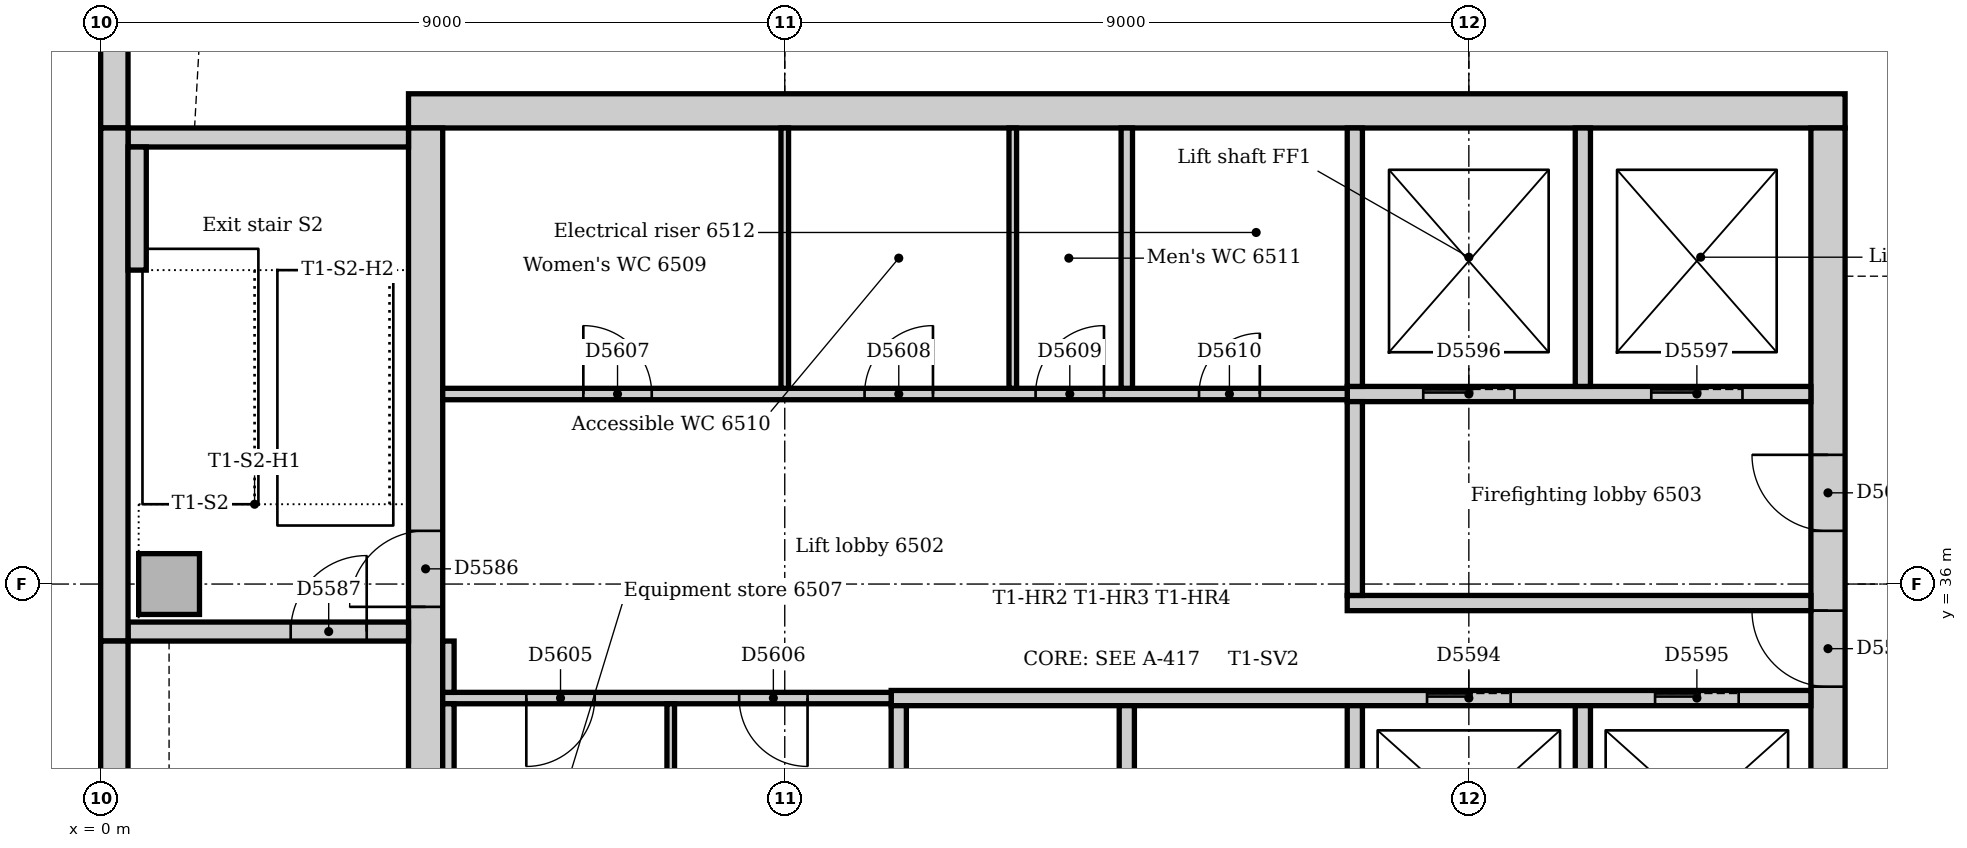
"""IFC4 building model, lengths in metres.
Left out: names, types, materials, properties, quantities, classifications, styles, units other than length and angle.
Written with IfcOpenShell. Run it as: python <this file> out.ifc"""

import sys

from ifc_helpers import new_model, si_unit, direction, frame, frame_2d, origin, origin_2d, place, context, subcontext, project, spatial, rectangle, extrude, element, fill, save


model = new_model("IFC4")
c1 = context("Model", 3, precision=1e-05, world=origin(), true_north=direction((0.0, 1.0)))
c2 = subcontext(c1, "Body", "Model", "MODEL_VIEW")
j1 = project(units=[si_unit("LENGTHUNIT", "METRE"), si_unit("PLANEANGLEUNIT", "RADIAN")], contexts=[c1])
p1 = place(None, origin())
s1 = spatial("IfcSite", under=j1, at=p1, CompositionType="ELEMENT")
p2 = place(p1, origin())
s2 = spatial("IfcBuilding", under=s1, at=p2, CompositionType="ELEMENT")
p3 = place(p2, frame((0.0, 0.0, 271.0)))
s3 = spatial("IfcBuildingStorey", under=s2, at=p3, CompositionType="ELEMENT", Elevation=271.0)
p4 = place(p3, frame((22.95, 42.225, 0.0), z_axis=(0.0, 0.0, 1.0), x_axis=(-1.0, 0.0, 0.0)))
e1 = element("IfcWall", 1, at=p4, inside=s3, PredefinedType="SOLIDWALL", context=c2, shape_type="SweptSolid", body=[
    extrude(rectangle(XDim=18.9, YDim=0.45, at=frame_2d((9.45, 0.0))), origin(), (0.0, 0.0, 1.0), 4.0),
])
p5 = place(p3, frame((22.725, 31.5, 0.0), z_axis=(0.0, 0.0, 1.0), x_axis=(0.0, 1.0, 0.0)))
e2 = element("IfcWall", 2, at=p5, inside=s3, PredefinedType="SOLIDWALL", context=c2, shape_type="SweptSolid", body=[
    extrude(rectangle(XDim=10.5, YDim=0.45, at=frame_2d((5.25, 0.0))), origin(), (0.0, 0.0, 1.0), 4.0),
])
p6 = place(p5, frame((3.15, 0.0, 0.0)))
e3 = element("IfcOpeningElement", 3, at=p6, cuts=e2, PredefinedType="OPENING", context=c2, shape_type="SweptSolid", body=[
    extrude(rectangle(XDim=1.0, YDim=2.1, at=frame_2d((0.5, 1.05))), frame((0.0, 0.235, 0.0), z_axis=(0.0, -1.0, 0.0), x_axis=(1.0, 0.0, 0.0)), (0.0, 0.0, 1.0), 0.47),
])
p7 = place(p5, frame((5.2, 0.0, 0.0)))
e4 = element("IfcOpeningElement", 4, at=p7, cuts=e2, PredefinedType="OPENING", context=c2, shape_type="SweptSolid", body=[
    extrude(rectangle(XDim=1.0, YDim=2.1, at=frame_2d((0.5, 1.05))), frame((0.0, 0.235, 0.0), z_axis=(0.0, -1.0, 0.0), x_axis=(1.0, 0.0, 0.0)), (0.0, 0.0, 1.0), 0.47),
])
p8 = place(p3, frame((4.275, 42.0, 0.0), z_axis=(0.0, 0.0, 1.0), x_axis=(0.0, -1.0, 0.0)))
e5 = element("IfcWall", 5, at=p8, inside=s3, PredefinedType="SOLIDWALL", context=c2, shape_type="SweptSolid", body=[
    extrude(rectangle(XDim=10.5, YDim=0.45, at=frame_2d((5.25, 0.0))), origin(), (0.0, 0.0, 1.0), 4.0),
])
p9 = place(p8, frame((5.3, 0.0, 0.0)))
e6 = element("IfcOpeningElement", 6, at=p9, cuts=e5, PredefinedType="OPENING", context=c2, shape_type="SweptSolid", body=[
    extrude(rectangle(XDim=1.0, YDim=2.1, at=frame_2d((0.5, 1.05))), frame((0.0, 0.235, 0.0), z_axis=(0.0, -1.0, 0.0), x_axis=(1.0, 0.0, 0.0)), (0.0, 0.0, 1.0), 0.47),
])
p10 = place(p3, frame((0.36, 35.375, 0.0), z_axis=(0.0, 0.0, 1.0), x_axis=(1.0, 0.0, 0.0)))
e7 = element("IfcWall", 7, at=p10, inside=s3, PredefinedType="SOLIDWALL", context=c2, shape_type="SweptSolid", body=[
    extrude(rectangle(XDim=3.69, YDim=0.25, at=frame_2d((1.845, 0.0))), origin(), (0.0, 0.0, 1.0), 4.0),
])
p11 = place(p10, frame((2.14, 0.0, 0.0)))
e8 = element("IfcOpeningElement", 8, at=p11, cuts=e7, PredefinedType="OPENING", context=c2, shape_type="SweptSolid", body=[
    extrude(rectangle(XDim=1.0, YDim=2.1, at=frame_2d((0.5, 1.05))), frame((0.0, 0.135, 0.0), z_axis=(0.0, -1.0, 0.0), x_axis=(1.0, 0.0, 0.0)), (0.0, 0.0, 1.0), 0.27),
])
p12 = place(p3, frame((4.05, 41.875, 0.0), z_axis=(0.0, 0.0, 1.0), x_axis=(-1.0, 0.0, 0.0)))
e9 = element("IfcWall", 9, at=p12, inside=s3, PredefinedType="SOLIDWALL", context=c2, shape_type="SweptSolid", body=[
    extrude(rectangle(XDim=3.69, YDim=0.25, at=frame_2d((1.845, 0.0))), origin(), (0.0, 0.0, 1.0), 4.0),
])
p13 = place(p3, frame((0.9, 36.0, 0.0), z_axis=(0.0, 0.0, 1.0), x_axis=(1.0, 0.0, 0.0)))
e10 = element("IfcColumn", 10, at=p13, inside=s3, PredefinedType="COLUMN", context=c2, shape_type="SweptSolid", body=[
    extrude(rectangle(XDim=0.8, YDim=0.8, at=origin_2d()), origin(), (0.0, 0.0, 1.0), 4.0),
])
p14 = place(p3, frame((0.18, 58.757, 0.0), z_axis=(0.0, 0.0, 1.0), x_axis=(0.0, -1.0, 0.0)))
e11 = element("IfcWall", 11, at=p14, inside=s3, PredefinedType="STANDARD", context=c2, shape_type="SweptSolid", body=[
    extrude(rectangle(XDim=16.757, YDim=0.36, at=frame_2d((8.379, 0.0))), origin(), (0.0, 0.0, 1.0), 3.85),
])
p15 = place(p14, frame((3.107, 0.0, 0.9)))
e12 = element("IfcOpeningElement", 12, at=p15, cuts=e11, PredefinedType="OPENING", context=c2, shape_type="SweptSolid", body=[
    extrude(rectangle(XDim=3.3, YDim=1.6, at=frame_2d((1.65, 0.8))), frame((0.0, 0.19, 0.0), z_axis=(0.0, -1.0, 0.0), x_axis=(1.0, 0.0, 0.0)), (0.0, 0.0, 1.0), 0.38),
])
p16 = place(p14, frame((7.607, 0.0, 0.9)))
e13 = element("IfcOpeningElement", 13, at=p16, cuts=e11, PredefinedType="OPENING", context=c2, shape_type="SweptSolid", body=[
    extrude(rectangle(XDim=3.3, YDim=1.6, at=frame_2d((1.65, 0.8))), frame((0.0, 0.19, 0.0), z_axis=(0.0, -1.0, 0.0), x_axis=(1.0, 0.0, 0.0)), (0.0, 0.0, 1.0), 0.38),
])
p17 = place(p14, frame((12.107, 0.0, 0.9)))
e14 = element("IfcOpeningElement", 14, at=p17, cuts=e11, PredefinedType="OPENING", context=c2, shape_type="SweptSolid", body=[
    extrude(rectangle(XDim=3.3, YDim=1.6, at=frame_2d((1.65, 0.8))), frame((0.0, 0.19, 0.0), z_axis=(0.0, -1.0, 0.0), x_axis=(1.0, 0.0, 0.0)), (0.0, 0.0, 1.0), 0.38),
])
p18 = place(p3, frame((0.18, 42.0, 0.0), z_axis=(0.0, 0.0, 1.0), x_axis=(0.0, -1.0, 0.0)))
e15 = element("IfcWall", 15, at=p18, inside=s3, PredefinedType="STANDARD", context=c2, shape_type="SweptSolid", body=[
    extrude(rectangle(XDim=6.75, YDim=0.36, at=frame_2d((3.375, 0.0))), origin(), (0.0, 0.0, 1.0), 3.85),
])
p19 = place(p3, frame((0.18, 35.25, 0.0), z_axis=(0.0, 0.0, 1.0), x_axis=(0.0, -1.0, 0.0)))
e16 = element("IfcWall", 16, at=p19, inside=s3, PredefinedType="STANDARD", context=c2, shape_type="SweptSolid", body=[
    extrude(rectangle(XDim=7.5, YDim=0.36, at=frame_2d((3.75, 0.0))), origin(), (0.0, 0.0, 1.0), 3.85),
])
p20 = place(p3, frame((0.48, 40.13, 0.0), z_axis=(0.0, 0.0, 1.0), x_axis=(0.0, 1.0, 0.0)))
e17 = element("IfcWall", 17, at=p20, inside=s3, PredefinedType="STANDARD", context=c2, shape_type="SweptSolid", body=[
    extrude(rectangle(XDim=1.62, YDim=0.24, at=frame_2d((0.81, 0.0))), origin(), (0.0, 0.0, 1.0), 4.0),
])
p21 = place(p3, frame((16.4, 35.75, 0.0), z_axis=(0.0, 0.0, 1.0), x_axis=(1.0, 0.0, 0.0)))
e18 = element("IfcWall", 18, at=p21, inside=s3, PredefinedType="PARTITIONING", context=c2, shape_type="SweptSolid", body=[
    extrude(rectangle(XDim=6.1, YDim=0.2, at=frame_2d((3.05, 0.0))), origin(), (0.0, 0.0, 1.0), 3.85),
])
p22 = place(p3, frame((16.4, 38.5, 0.0), z_axis=(0.0, 0.0, 1.0), x_axis=(1.0, 0.0, 0.0)))
e19 = element("IfcWall", 19, at=p22, inside=s3, PredefinedType="PARTITIONING", context=c2, shape_type="SweptSolid", body=[
    extrude(rectangle(XDim=6.1, YDim=0.2, at=frame_2d((3.05, 0.0))), origin(), (0.0, 0.0, 1.0), 3.85),
])
p23 = place(p22, frame((1.0, 0.0, 0.0)))
e20 = element("IfcOpeningElement", 20, at=p23, cuts=e19, PredefinedType="OPENING", context=c2, shape_type="SweptSolid", body=[
    extrude(rectangle(XDim=1.2, YDim=2.1, at=frame_2d((0.6, 1.05))), frame((0.0, 0.11, 0.0), z_axis=(0.0, -1.0, 0.0), x_axis=(1.0, 0.0, 0.0)), (0.0, 0.0, 1.0), 0.22),
])
p24 = place(p22, frame((4.0, 0.0, 0.0)))
e21 = element("IfcOpeningElement", 21, at=p24, cuts=e19, PredefinedType="OPENING", context=c2, shape_type="SweptSolid", body=[
    extrude(rectangle(XDim=1.2, YDim=2.1, at=frame_2d((0.6, 1.05))), frame((0.0, 0.11, 0.0), z_axis=(0.0, -1.0, 0.0), x_axis=(1.0, 0.0, 0.0)), (0.0, 0.0, 1.0), 0.22),
])
p25 = place(p3, frame((16.5, 35.85, 0.0), z_axis=(0.0, 0.0, 1.0), x_axis=(0.0, 1.0, 0.0)))
e22 = element("IfcWall", 22, at=p25, inside=s3, PredefinedType="PARTITIONING", context=c2, shape_type="SweptSolid", body=[
    extrude(rectangle(XDim=2.55, YDim=0.2, at=frame_2d((1.275, 0.0))), origin(), (0.0, 0.0, 1.0), 3.85),
])
p26 = place(p3, frame((10.4, 34.5, 0.0), z_axis=(0.0, 0.0, 1.0), x_axis=(1.0, 0.0, 0.0)))
e23 = element("IfcWall", 23, at=p26, inside=s3, PredefinedType="PARTITIONING", context=c2, shape_type="SweptSolid", body=[
    extrude(rectangle(XDim=12.1, YDim=0.2, at=frame_2d((6.05, 0.0))), origin(), (0.0, 0.0, 1.0), 3.85),
])
p27 = place(p26, frame((7.05, 0.0, 0.0)))
e24 = element("IfcOpeningElement", 24, at=p27, cuts=e23, PredefinedType="OPENING", context=c2, shape_type="SweptSolid", body=[
    extrude(rectangle(XDim=1.1, YDim=2.1, at=frame_2d((0.55, 1.05))), frame((0.0, 0.11, 0.0), z_axis=(0.0, -1.0, 0.0), x_axis=(1.0, 0.0, 0.0)), (0.0, 0.0, 1.0), 0.22),
])
p28 = place(p26, frame((10.05, 0.0, 0.0)))
e25 = element("IfcOpeningElement", 25, at=p28, cuts=e23, PredefinedType="OPENING", context=c2, shape_type="SweptSolid", body=[
    extrude(rectangle(XDim=1.1, YDim=2.1, at=frame_2d((0.55, 1.05))), frame((0.0, 0.11, 0.0), z_axis=(0.0, -1.0, 0.0), x_axis=(1.0, 0.0, 0.0)), (0.0, 0.0, 1.0), 0.22),
])
for number, where, z_axis, x_axis in (
    (26, (10.5, 31.75, 0.0), (0.0, 0.0, 1.0), (0.0, 1.0, 0.0)),
    (27, (13.5, 31.75, 0.0), (0.0, 0.0, 1.0), (0.0, 1.0, 0.0)),
    (28, (16.5, 31.75, 0.0), (0.0, 0.0, 1.0), (0.0, 1.0, 0.0)),
    (29, (19.5, 31.75, 0.0), (0.0, 0.0, 1.0), (0.0, 1.0, 0.0)),
):
    element("IfcWall", number, at=place(p3, frame(where, z_axis=z_axis, x_axis=x_axis)), inside=s3, PredefinedType="PARTITIONING", context=c2, shape_type="SweptSolid", body=[
        extrude(rectangle(XDim=2.65, YDim=0.2, at=frame_2d((1.325, 0.0))), origin(), (0.0, 0.0, 1.0), 3.85),
    ])
for number, where, z_axis, x_axis in (
    (30, (16.5, 38.6, 0.0), (0.0, 0.0, 1.0), (0.0, 1.0, 0.0)),
    (31, (19.5, 38.6, 0.0), (0.0, 0.0, 1.0), (0.0, 1.0, 0.0)),
):
    element("IfcWall", number, at=place(p3, frame(where, z_axis=z_axis, x_axis=x_axis)), inside=s3, PredefinedType="PARTITIONING", context=c2, shape_type="SweptSolid", body=[
        extrude(rectangle(XDim=3.4, YDim=0.2, at=frame_2d((1.7, 0.0))), origin(), (0.0, 0.0, 1.0), 3.85),
    ])
p29 = place(p3, frame((4.5, 38.5, 0.0), z_axis=(0.0, 0.0, 1.0), x_axis=(1.0, 0.0, 0.0)))
e32 = element("IfcWall", 32, at=p29, inside=s3, PredefinedType="PARTITIONING", context=c2, shape_type="SweptSolid", body=[
    extrude(rectangle(XDim=11.9, YDim=0.15, at=frame_2d((5.95, 0.0))), origin(), (0.0, 0.0, 1.0), 3.85),
])
p30 = place(p29, frame((1.85, 0.0, 0.0)))
e33 = element("IfcOpeningElement", 33, at=p30, cuts=e32, PredefinedType="OPENING", context=c2, shape_type="SweptSolid", body=[
    extrude(rectangle(XDim=0.9, YDim=2.1, at=frame_2d((0.45, 1.05))), frame((0.0, 0.085, 0.0), z_axis=(0.0, -1.0, 0.0), x_axis=(1.0, 0.0, 0.0)), (0.0, 0.0, 1.0), 0.17),
])
p31 = place(p29, frame((5.55, 0.0, 0.0)))
e34 = element("IfcOpeningElement", 34, at=p31, cuts=e32, PredefinedType="OPENING", context=c2, shape_type="SweptSolid", body=[
    extrude(rectangle(XDim=0.9, YDim=2.1, at=frame_2d((0.45, 1.05))), frame((0.0, 0.085, 0.0), z_axis=(0.0, -1.0, 0.0), x_axis=(1.0, 0.0, 0.0)), (0.0, 0.0, 1.0), 0.17),
])
p32 = place(p29, frame((7.8, 0.0, 0.0)))
e35 = element("IfcOpeningElement", 35, at=p32, cuts=e32, PredefinedType="OPENING", context=c2, shape_type="SweptSolid", body=[
    extrude(rectangle(XDim=0.9, YDim=2.1, at=frame_2d((0.45, 1.05))), frame((0.0, 0.085, 0.0), z_axis=(0.0, -1.0, 0.0), x_axis=(1.0, 0.0, 0.0)), (0.0, 0.0, 1.0), 0.17),
])
p33 = place(p29, frame((9.95, 0.0, 0.0)))
e36 = element("IfcOpeningElement", 36, at=p33, cuts=e32, PredefinedType="OPENING", context=c2, shape_type="SweptSolid", body=[
    extrude(rectangle(XDim=0.8, YDim=2.1, at=frame_2d((0.4, 1.05))), frame((0.0, 0.085, 0.0), z_axis=(0.0, -1.0, 0.0), x_axis=(1.0, 0.0, 0.0)), (0.0, 0.0, 1.0), 0.17),
])
p34 = place(p3, frame((4.5, 34.5, 0.0), z_axis=(0.0, 0.0, 1.0), x_axis=(1.0, 0.0, 0.0)))
e37 = element("IfcWall", 37, at=p34, inside=s3, PredefinedType="PARTITIONING", context=c2, shape_type="SweptSolid", body=[
    extrude(rectangle(XDim=5.9, YDim=0.15, at=frame_2d((2.95, 0.0))), origin(), (0.0, 0.0, 1.0), 3.85),
])
p35 = place(p34, frame((1.1, 0.0, 0.0)))
e38 = element("IfcOpeningElement", 38, at=p35, cuts=e37, PredefinedType="OPENING", context=c2, shape_type="SweptSolid", body=[
    extrude(rectangle(XDim=0.9, YDim=2.1, at=frame_2d((0.45, 1.05))), frame((0.0, 0.085, 0.0), z_axis=(0.0, -1.0, 0.0), x_axis=(1.0, 0.0, 0.0)), (0.0, 0.0, 1.0), 0.17),
])
p36 = place(p34, frame((3.9, 0.0, 0.0)))
e39 = element("IfcOpeningElement", 39, at=p36, cuts=e37, PredefinedType="OPENING", context=c2, shape_type="SweptSolid", body=[
    extrude(rectangle(XDim=0.9, YDim=2.1, at=frame_2d((0.45, 1.05))), frame((0.0, 0.085, 0.0), z_axis=(0.0, -1.0, 0.0), x_axis=(1.0, 0.0, 0.0)), (0.0, 0.0, 1.0), 0.17),
])
p37 = place(p3, frame((4.575, 34.575, 0.0), z_axis=(0.0, 0.0, 1.0), x_axis=(0.0, 1.0, 0.0)))
e40 = element("IfcWall", 40, at=p37, inside=s3, PredefinedType="PARTITIONING", context=c2, shape_type="SweptSolid", body=[
    extrude(rectangle(XDim=0.675, YDim=0.15, at=frame_2d((0.338, 0.0))), origin(), (0.0, 0.0, 1.0), 3.85),
])
p38 = place(p3, frame((4.575, 31.75, 0.0), z_axis=(0.0, 0.0, 1.0), x_axis=(0.0, 1.0, 0.0)))
e41 = element("IfcWall", 41, at=p38, inside=s3, PredefinedType="PARTITIONING", context=c2, shape_type="SweptSolid", body=[
    extrude(rectangle(XDim=2.675, YDim=0.15, at=frame_2d((1.337, 0.0))), origin(), (0.0, 0.0, 1.0), 3.85),
])
p39 = place(p3, frame((13.5, 38.575, 0.0), z_axis=(0.0, 0.0, 1.0), x_axis=(0.0, 1.0, 0.0)))
e42 = element("IfcWall", 42, at=p39, inside=s3, PredefinedType="PARTITIONING", context=c2, shape_type="SweptSolid", body=[
    extrude(rectangle(XDim=3.425, YDim=0.15, at=frame_2d((1.712, 0.0))), origin(), (0.0, 0.0, 1.0), 3.85),
])
for number, where, z_axis, x_axis in (
    (43, (9.0, 38.575, 0.0), (0.0, 0.0, 1.0), (0.0, 1.0, 0.0)),
    (44, (12.0, 38.575, 0.0), (0.0, 0.0, 1.0), (0.0, 1.0, 0.0)),
):
    element("IfcWall", number, at=place(p3, frame(where, z_axis=z_axis, x_axis=x_axis)), inside=s3, PredefinedType="PARTITIONING", context=c2, shape_type="SweptSolid", body=[
        extrude(rectangle(XDim=3.425, YDim=0.1, at=frame_2d((1.712, 0.0))), origin(), (0.0, 0.0, 1.0), 3.85),
    ])
p40 = place(p3, frame((7.5, 31.75, 0.0), z_axis=(0.0, 0.0, 1.0), x_axis=(0.0, 1.0, 0.0)))
e45 = element("IfcWall", 45, at=p40, inside=s3, PredefinedType="PARTITIONING", context=c2, shape_type="SweptSolid", body=[
    extrude(rectangle(XDim=2.675, YDim=0.1, at=frame_2d((1.337, 0.0))), origin(), (0.0, 0.0, 1.0), 3.85),
])
p41 = place(p9, frame((1.0, 0.0, 0.0), z_axis=(0.0, 0.0, 1.0), x_axis=(-1.0, 0.0, 0.0)))
e46 = element("IfcDoor", 46, at=p41, inside=s3, OperationType="SINGLE_SWING_LEFT", PredefinedType="DOOR", context=c2, shape_type="SweptSolid", body=[
    extrude(rectangle(XDim=1.0, YDim=2.1, at=frame_2d((0.5, 1.05))), frame((0.0, 0.025, 0.0), z_axis=(0.0, -1.0, 0.0), x_axis=(1.0, 0.0, 0.0)), (0.0, 0.0, 1.0), 0.05),
])
fill(e6, e46)
p42 = place(p11, origin())
e47 = element("IfcDoor", 47, at=p42, inside=s3, OperationType="SINGLE_SWING_RIGHT", PredefinedType="DOOR", context=c2, shape_type="SweptSolid", body=[
    extrude(rectangle(XDim=1.0, YDim=2.1, at=frame_2d((0.5, 1.05))), frame((0.0, 0.025, 0.0), z_axis=(0.0, -1.0, 0.0), x_axis=(1.0, 0.0, 0.0)), (0.0, 0.0, 1.0), 0.05),
])
fill(e8, e47)
p43 = place(p27, origin())
e48 = element("IfcDoor", 48, at=p43, inside=s3, OperationType="SLIDING_TO_LEFT", PredefinedType="DOOR", context=c2, shape_type="SweptSolid", body=[
    extrude(rectangle(XDim=1.1, YDim=2.1, at=frame_2d((0.55, 1.05))), frame((0.0, 0.025, 0.0), z_axis=(0.0, -1.0, 0.0), x_axis=(1.0, 0.0, 0.0)), (0.0, 0.0, 1.0), 0.05),
])
fill(e24, e48)
p44 = place(p28, origin())
e49 = element("IfcDoor", 49, at=p44, inside=s3, OperationType="SLIDING_TO_LEFT", PredefinedType="DOOR", context=c2, shape_type="SweptSolid", body=[
    extrude(rectangle(XDim=1.1, YDim=2.1, at=frame_2d((0.55, 1.05))), frame((0.0, 0.025, 0.0), z_axis=(0.0, -1.0, 0.0), x_axis=(1.0, 0.0, 0.0)), (0.0, 0.0, 1.0), 0.05),
])
fill(e25, e49)
p45 = place(p23, origin())
e50 = element("IfcDoor", 50, at=p45, inside=s3, OperationType="SLIDING_TO_LEFT", PredefinedType="DOOR", context=c2, shape_type="SweptSolid", body=[
    extrude(rectangle(XDim=1.2, YDim=2.1, at=frame_2d((0.6, 1.05))), frame((0.0, 0.025, 0.0), z_axis=(0.0, -1.0, 0.0), x_axis=(1.0, 0.0, 0.0)), (0.0, 0.0, 1.0), 0.05),
])
fill(e20, e50)
p46 = place(p24, origin())
e51 = element("IfcDoor", 51, at=p46, inside=s3, OperationType="SLIDING_TO_LEFT", PredefinedType="DOOR", context=c2, shape_type="SweptSolid", body=[
    extrude(rectangle(XDim=1.2, YDim=2.1, at=frame_2d((0.6, 1.05))), frame((0.0, 0.025, 0.0), z_axis=(0.0, -1.0, 0.0), x_axis=(1.0, 0.0, 0.0)), (0.0, 0.0, 1.0), 0.05),
])
fill(e21, e51)
p47 = place(p6, origin())
e52 = element("IfcDoor", 52, at=p47, inside=s3, OperationType="SINGLE_SWING_RIGHT", PredefinedType="DOOR", context=c2, shape_type="SweptSolid", body=[
    extrude(rectangle(XDim=1.0, YDim=2.1, at=frame_2d((0.5, 1.05))), frame((0.0, 0.025, 0.0), z_axis=(0.0, -1.0, 0.0), x_axis=(1.0, 0.0, 0.0)), (0.0, 0.0, 1.0), 0.05),
])
fill(e3, e52)
p48 = place(p7, origin())
e53 = element("IfcDoor", 53, at=p48, inside=s3, OperationType="SINGLE_SWING_RIGHT", PredefinedType="DOOR", context=c2, shape_type="SweptSolid", body=[
    extrude(rectangle(XDim=1.0, YDim=2.1, at=frame_2d((0.5, 1.05))), frame((0.0, 0.025, 0.0), z_axis=(0.0, -1.0, 0.0), x_axis=(1.0, 0.0, 0.0)), (0.0, 0.0, 1.0), 0.05),
])
fill(e4, e53)
p49 = place(p35, frame((0.9, 0.0, 0.0), z_axis=(0.0, 0.0, 1.0), x_axis=(-1.0, 0.0, 0.0)))
e54 = element("IfcDoor", 54, at=p49, inside=s3, OperationType="SINGLE_SWING_RIGHT", PredefinedType="DOOR", context=c2, shape_type="SweptSolid", body=[
    extrude(rectangle(XDim=0.9, YDim=2.1, at=frame_2d((0.45, 1.05))), frame((0.0, 0.025, 0.0), z_axis=(0.0, -1.0, 0.0), x_axis=(1.0, 0.0, 0.0)), (0.0, 0.0, 1.0), 0.05),
])
fill(e38, e54)
p50 = place(p36, frame((0.9, 0.0, 0.0), z_axis=(0.0, 0.0, 1.0), x_axis=(-1.0, 0.0, 0.0)))
e55 = element("IfcDoor", 55, at=p50, inside=s3, OperationType="SINGLE_SWING_LEFT", PredefinedType="DOOR", context=c2, shape_type="SweptSolid", body=[
    extrude(rectangle(XDim=0.9, YDim=2.1, at=frame_2d((0.45, 1.05))), frame((0.0, 0.025, 0.0), z_axis=(0.0, -1.0, 0.0), x_axis=(1.0, 0.0, 0.0)), (0.0, 0.0, 1.0), 0.05),
])
fill(e39, e55)
p51 = place(p30, origin())
e56 = element("IfcDoor", 56, at=p51, inside=s3, OperationType="SINGLE_SWING_LEFT", PredefinedType="DOOR", context=c2, shape_type="SweptSolid", body=[
    extrude(rectangle(XDim=0.9, YDim=2.1, at=frame_2d((0.45, 1.05))), frame((0.0, 0.025, 0.0), z_axis=(0.0, -1.0, 0.0), x_axis=(1.0, 0.0, 0.0)), (0.0, 0.0, 1.0), 0.05),
])
fill(e33, e56)
p52 = place(p31, origin())
e57 = element("IfcDoor", 57, at=p52, inside=s3, OperationType="SINGLE_SWING_RIGHT", PredefinedType="DOOR", context=c2, shape_type="SweptSolid", body=[
    extrude(rectangle(XDim=0.9, YDim=2.1, at=frame_2d((0.45, 1.05))), frame((0.0, 0.025, 0.0), z_axis=(0.0, -1.0, 0.0), x_axis=(1.0, 0.0, 0.0)), (0.0, 0.0, 1.0), 0.05),
])
fill(e34, e57)
p53 = place(p32, origin())
e58 = element("IfcDoor", 58, at=p53, inside=s3, OperationType="SINGLE_SWING_RIGHT", PredefinedType="DOOR", context=c2, shape_type="SweptSolid", body=[
    extrude(rectangle(XDim=0.9, YDim=2.1, at=frame_2d((0.45, 1.05))), frame((0.0, 0.025, 0.0), z_axis=(0.0, -1.0, 0.0), x_axis=(1.0, 0.0, 0.0)), (0.0, 0.0, 1.0), 0.05),
])
fill(e35, e58)
p54 = place(p33, origin())
e59 = element("IfcDoor", 59, at=p54, inside=s3, OperationType="SINGLE_SWING_RIGHT", PredefinedType="DOOR", context=c2, shape_type="SweptSolid", body=[
    extrude(rectangle(XDim=0.8, YDim=2.1, at=frame_2d((0.4, 1.05))), frame((0.0, 0.025, 0.0), z_axis=(0.0, -1.0, 0.0), x_axis=(1.0, 0.0, 0.0)), (0.0, 0.0, 1.0), 0.05),
])
fill(e36, e59)
save(model, sys.argv[1])
